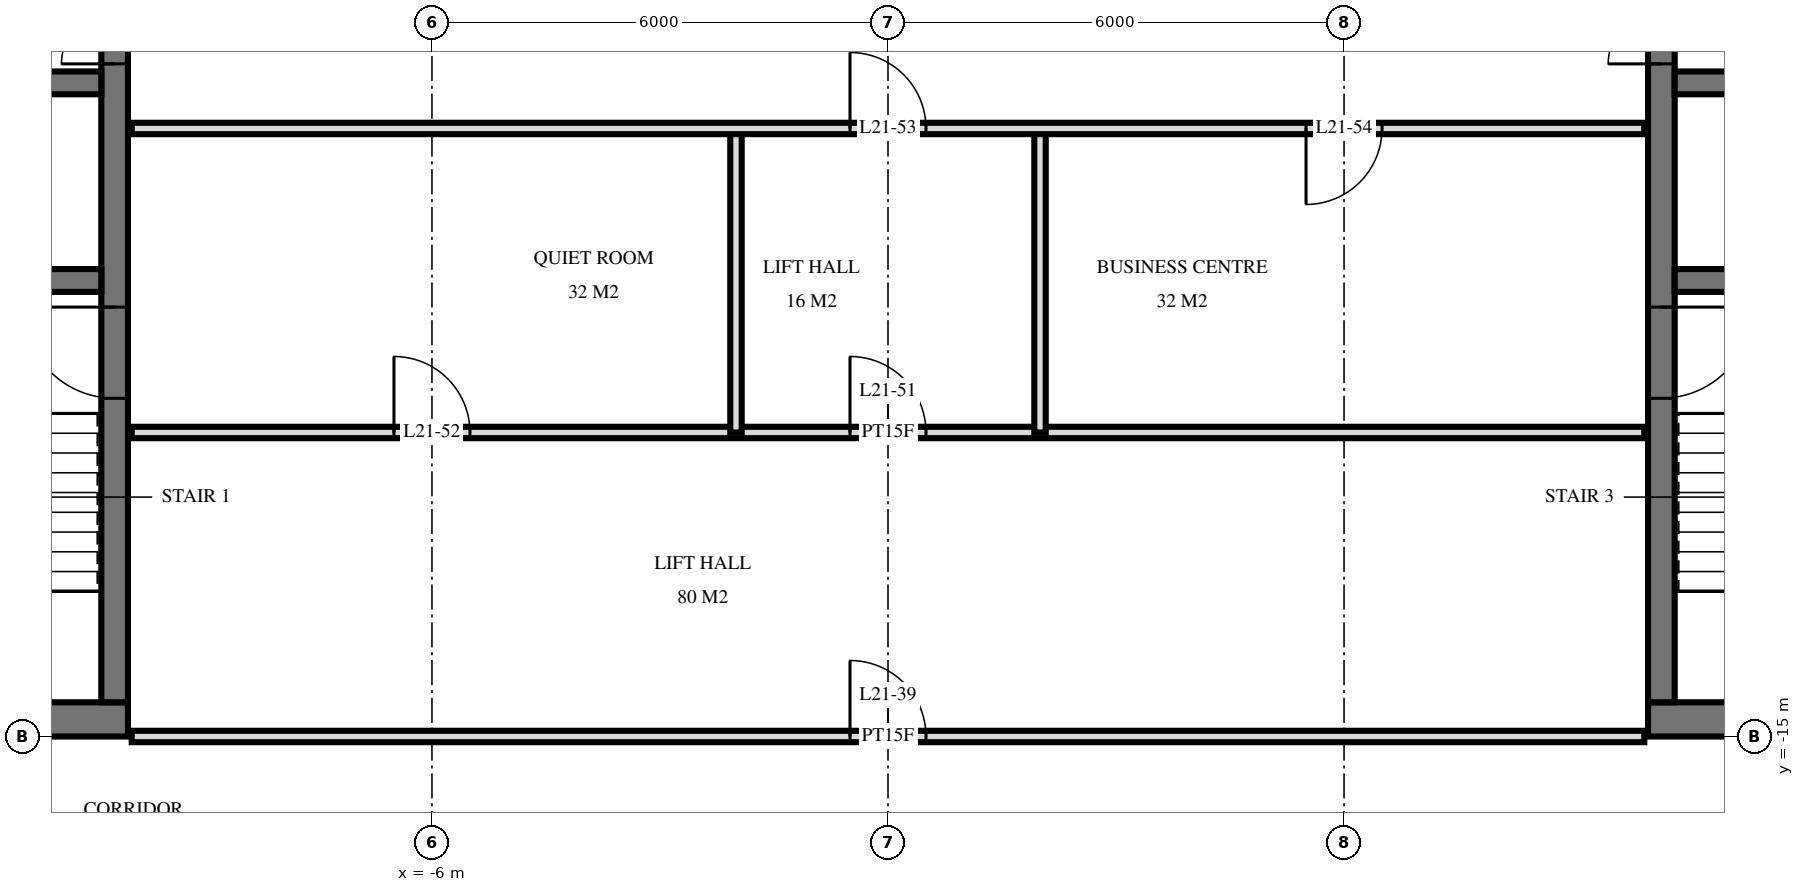
"""IFC4 building model, lengths in metres.
Left out: names, types, materials, properties, quantities, classifications, styles, units other than length and angle.
Written with IfcOpenShell. Run it as: python <this file> out.ifc"""

import sys

from ifc_helpers import new_model, si_unit, direction, frame, frame_2d, origin, place, context, subcontext, project, spatial, rectangle, extrude, element, fill, save


model = new_model("IFC4")
c1 = context("Model", 3, precision=1e-05, world=origin(), true_north=direction((0.0, 1.0)))
c2 = subcontext(c1, "Body", "Model", "MODEL_VIEW")
j1 = project(units=[si_unit("LENGTHUNIT", "METRE"), si_unit("PLANEANGLEUNIT", "RADIAN")], contexts=[c1])
p1 = place(None, origin())
s1 = spatial("IfcSite", under=j1, at=p1, CompositionType="ELEMENT")
p2 = place(p1, origin())
s2 = spatial("IfcBuilding", under=s1, at=p2, CompositionType="ELEMENT")
p3 = place(p2, frame((0.0, 0.0, 85.2)))
s3 = spatial("IfcBuildingStorey", under=s2, at=p3, CompositionType="ELEMENT", Elevation=85.2)
p4 = place(p3, frame((-29.5, -14.775, 0.0), z_axis=(0.0, 0.0, 1.0), x_axis=(1.0, 0.0, 0.0)))
e1 = element("IfcWall", 1, at=p4, inside=s3, PredefinedType="SHEAR", context=c2, shape_type="SweptSolid", body=[
    extrude(rectangle(XDim=19.5, YDim=0.45, at=frame_2d((9.75, 0.0))), origin(), (0.0, 0.0, 1.0), 3.6),
])
p5 = place(p4, frame((11.2, 0.0, 0.0)))
e2 = element("IfcOpeningElement", 2, at=p5, cuts=e1, PredefinedType="OPENING", context=c2, shape_type="SweptSolid", body=[
    extrude(rectangle(XDim=1.2, YDim=2.1, at=frame_2d((0.6, 1.05))), frame((0.0, 0.235, 0.0), z_axis=(0.0, -1.0, 0.0), x_axis=(1.0, 0.0, 0.0)), (0.0, 0.0, 1.0), 0.47),
])
p6 = place(p4, frame((14.25, 0.0, 0.0)))
e3 = element("IfcOpeningElement", 3, at=p6, cuts=e1, PredefinedType="OPENING", context=c2, shape_type="SweptSolid", body=[
    extrude(rectangle(XDim=1.1, YDim=2.1, at=frame_2d((0.55, 1.05))), frame((0.0, 0.235, 0.0), z_axis=(0.0, -1.0, 0.0), x_axis=(1.0, 0.0, 0.0)), (0.0, 0.0, 1.0), 0.47),
])
p7 = place(p4, frame((8.5, 0.0, 0.0)))
e4 = element("IfcOpeningElement", 4, at=p7, cuts=e1, PredefinedType="OPENING", context=c2, shape_type="SweptSolid", body=[
    extrude(rectangle(XDim=0.9, YDim=2.1, at=frame_2d((0.45, 1.05))), frame((0.0, 0.235, 0.0), z_axis=(0.0, -1.0, 0.0), x_axis=(1.0, 0.0, 0.0)), (0.0, 0.0, 1.0), 0.47),
])
p8 = place(p4, frame((6.05, 0.0, 0.0)))
e5 = element("IfcOpeningElement", 5, at=p8, cuts=e1, PredefinedType="OPENING", context=c2, shape_type="SweptSolid", body=[
    extrude(rectangle(XDim=1.0, YDim=2.1, at=frame_2d((0.5, 1.05))), frame((0.0, 0.235, 0.0), z_axis=(0.0, -1.0, 0.0), x_axis=(1.0, 0.0, 0.0)), (0.0, 0.0, 1.0), 0.47),
])
p9 = place(p4, frame((3.587, 0.0, 0.0)))
e6 = element("IfcOpeningElement", 6, at=p9, cuts=e1, PredefinedType="OPENING", context=c2, shape_type="SweptSolid", body=[
    extrude(rectangle(XDim=1.0, YDim=2.1, at=frame_2d((0.5, 1.05))), frame((0.0, 0.235, 0.0), z_axis=(0.0, -1.0, 0.0), x_axis=(1.0, 0.0, 0.0)), (0.0, 0.0, 1.0), 0.47),
])
p10 = place(p4, frame((1.85, 0.0, 0.0)))
e7 = element("IfcOpeningElement", 7, at=p10, cuts=e1, PredefinedType="OPENING", context=c2, shape_type="SweptSolid", body=[
    extrude(rectangle(XDim=1.0, YDim=2.1, at=frame_2d((0.5, 1.05))), frame((0.0, 0.235, 0.0), z_axis=(0.0, -1.0, 0.0), x_axis=(1.0, 0.0, 0.0)), (0.0, 0.0, 1.0), 0.47),
])
p11 = place(p4, frame((0.55, 0.0, 0.0)))
e8 = element("IfcOpeningElement", 8, at=p11, cuts=e1, PredefinedType="OPENING", context=c2, shape_type="SweptSolid", body=[
    extrude(rectangle(XDim=1.0, YDim=2.1, at=frame_2d((0.5, 1.05))), frame((0.0, 0.235, 0.0), z_axis=(0.0, -1.0, 0.0), x_axis=(1.0, 0.0, 0.0)), (0.0, 0.0, 1.0), 0.47),
])
p12 = place(p3, frame((-10.175, -14.55, 0.0), z_axis=(0.0, 0.0, 1.0), x_axis=(0.0, 1.0, 0.0)))
e9 = element("IfcWall", 9, at=p12, inside=s3, PredefinedType="SHEAR", context=c2, shape_type="SweptSolid", body=[
    extrude(rectangle(XDim=14.1, YDim=0.35, at=frame_2d((7.05, 0.0))), origin(), (0.0, 0.0, 1.0), 3.6),
])
p13 = place(p12, frame((8.4, 0.0, 0.0)))
e10 = element("IfcOpeningElement", 10, at=p13, cuts=e9, PredefinedType="OPENING", context=c2, shape_type="SweptSolid", body=[
    extrude(rectangle(XDim=1.4, YDim=2.4, at=frame_2d((0.7, 1.2))), frame((0.0, 0.185, 0.0), z_axis=(0.0, -1.0, 0.0), x_axis=(1.0, 0.0, 0.0)), (0.0, 0.0, 1.0), 0.37),
])
p14 = place(p12, frame((10.0, 0.0, 0.0)))
e11 = element("IfcOpeningElement", 11, at=p14, cuts=e9, PredefinedType="OPENING", context=c2, shape_type="SweptSolid", body=[
    extrude(rectangle(XDim=1.4, YDim=2.4, at=frame_2d((0.7, 1.2))), frame((0.0, 0.185, 0.0), z_axis=(0.0, -1.0, 0.0), x_axis=(1.0, 0.0, 0.0)), (0.0, 0.0, 1.0), 0.37),
])
p15 = place(p12, frame((4.0, 0.0, 0.0)))
e12 = element("IfcOpeningElement", 12, at=p15, cuts=e9, PredefinedType="OPENING", context=c2, shape_type="SweptSolid", body=[
    extrude(rectangle(XDim=1.2, YDim=2.1, at=frame_2d((0.6, 1.05))), frame((0.0, 0.185, 0.0), z_axis=(0.0, -1.0, 0.0), x_axis=(1.0, 0.0, 0.0)), (0.0, 0.0, 1.0), 0.37),
])
p16 = place(p3, frame((-29.05, -6.4, 0.0), z_axis=(0.0, 0.0, 1.0), x_axis=(1.0, 0.0, 0.0)))
e13 = element("IfcWall", 13, at=p16, inside=s3, PredefinedType="SHEAR", context=c2, shape_type="SweptSolid", body=[
    extrude(rectangle(XDim=18.7, YDim=0.3, at=frame_2d((9.35, 0.0))), origin(), (0.0, 0.0, 1.0), 3.6),
])
p17 = place(p16, frame((2.95, 0.0, 0.0)))
e14 = element("IfcOpeningElement", 14, at=p17, cuts=e13, PredefinedType="OPENING", context=c2, shape_type="SweptSolid", body=[
    extrude(rectangle(XDim=1.1, YDim=2.1, at=frame_2d((0.55, 1.05))), frame((0.0, 0.16, 0.0), z_axis=(0.0, -1.0, 0.0), x_axis=(1.0, 0.0, 0.0)), (0.0, 0.0, 1.0), 0.32),
])
p18 = place(p16, frame((0.55, 0.0, 0.0)))
e15 = element("IfcOpeningElement", 15, at=p18, cuts=e13, PredefinedType="OPENING", context=c2, shape_type="SweptSolid", body=[
    extrude(rectangle(XDim=1.1, YDim=2.1, at=frame_2d((0.55, 1.05))), frame((0.0, 0.16, 0.0), z_axis=(0.0, -1.0, 0.0), x_axis=(1.0, 0.0, 0.0)), (0.0, 0.0, 1.0), 0.32),
])
p19 = place(p16, frame((10.8, 0.0, 0.0)))
e16 = element("IfcOpeningElement", 16, at=p19, cuts=e13, PredefinedType="OPENING", context=c2, shape_type="SweptSolid", body=[
    extrude(rectangle(XDim=1.1, YDim=2.1, at=frame_2d((0.55, 1.05))), frame((0.0, 0.16, 0.0), z_axis=(0.0, -1.0, 0.0), x_axis=(1.0, 0.0, 0.0)), (0.0, 0.0, 1.0), 0.32),
])
p20 = place(p16, frame((5.6, 0.0, 0.0)))
e17 = element("IfcOpeningElement", 17, at=p20, cuts=e13, PredefinedType="OPENING", context=c2, shape_type="SweptSolid", body=[
    extrude(rectangle(XDim=1.0, YDim=2.1, at=frame_2d((0.5, 1.05))), frame((0.0, 0.16, 0.0), z_axis=(0.0, -1.0, 0.0), x_axis=(1.0, 0.0, 0.0)), (0.0, 0.0, 1.0), 0.32),
])
p21 = place(p3, frame((-29.05, -9.0, 0.0), z_axis=(0.0, 0.0, 1.0), x_axis=(1.0, 0.0, 0.0)))
e18 = element("IfcWall", 18, at=p21, inside=s3, PredefinedType="SHEAR", context=c2, shape_type="SweptSolid", body=[
    extrude(rectangle(XDim=18.7, YDim=0.3, at=frame_2d((9.35, 0.0))), origin(), (0.0, 0.0, 1.0), 3.6),
])
p22 = place(p21, frame((13.8, 0.0, 0.0)))
e19 = element("IfcOpeningElement", 19, at=p22, cuts=e18, PredefinedType="OPENING", context=c2, shape_type="SweptSolid", body=[
    extrude(rectangle(XDim=1.1, YDim=2.1, at=frame_2d((0.55, 1.05))), frame((0.0, 0.16, 0.0), z_axis=(0.0, -1.0, 0.0), x_axis=(1.0, 0.0, 0.0)), (0.0, 0.0, 1.0), 0.32),
])
p23 = place(p3, frame((10.0, -14.775, 0.0), z_axis=(0.0, 0.0, 1.0), x_axis=(1.0, 0.0, 0.0)))
e20 = element("IfcWall", 20, at=p23, inside=s3, PredefinedType="SHEAR", context=c2, shape_type="SweptSolid", body=[
    extrude(rectangle(XDim=19.5, YDim=0.45, at=frame_2d((9.75, 0.0))), origin(), (0.0, 0.0, 1.0), 3.6),
])
p24 = place(p23, frame((7.1, 0.0, 0.0)))
e21 = element("IfcOpeningElement", 21, at=p24, cuts=e20, PredefinedType="OPENING", context=c2, shape_type="SweptSolid", body=[
    extrude(rectangle(XDim=1.2, YDim=2.1, at=frame_2d((0.6, 1.05))), frame((0.0, 0.235, 0.0), z_axis=(0.0, -1.0, 0.0), x_axis=(1.0, 0.0, 0.0)), (0.0, 0.0, 1.0), 0.47),
])
p25 = place(p23, frame((4.15, 0.0, 0.0)))
e22 = element("IfcOpeningElement", 22, at=p25, cuts=e20, PredefinedType="OPENING", context=c2, shape_type="SweptSolid", body=[
    extrude(rectangle(XDim=1.1, YDim=2.1, at=frame_2d((0.55, 1.05))), frame((0.0, 0.235, 0.0), z_axis=(0.0, -1.0, 0.0), x_axis=(1.0, 0.0, 0.0)), (0.0, 0.0, 1.0), 0.47),
])
p26 = place(p23, frame((10.1, 0.0, 0.0)))
e23 = element("IfcOpeningElement", 23, at=p26, cuts=e20, PredefinedType="OPENING", context=c2, shape_type="SweptSolid", body=[
    extrude(rectangle(XDim=0.9, YDim=2.1, at=frame_2d((0.45, 1.05))), frame((0.0, 0.235, 0.0), z_axis=(0.0, -1.0, 0.0), x_axis=(1.0, 0.0, 0.0)), (0.0, 0.0, 1.0), 0.47),
])
p27 = place(p23, frame((12.45, 0.0, 0.0)))
e24 = element("IfcOpeningElement", 24, at=p27, cuts=e20, PredefinedType="OPENING", context=c2, shape_type="SweptSolid", body=[
    extrude(rectangle(XDim=1.0, YDim=2.1, at=frame_2d((0.5, 1.05))), frame((0.0, 0.235, 0.0), z_axis=(0.0, -1.0, 0.0), x_axis=(1.0, 0.0, 0.0)), (0.0, 0.0, 1.0), 0.47),
])
p28 = place(p23, frame((14.913, 0.0, 0.0)))
e25 = element("IfcOpeningElement", 25, at=p28, cuts=e20, PredefinedType="OPENING", context=c2, shape_type="SweptSolid", body=[
    extrude(rectangle(XDim=1.0, YDim=2.1, at=frame_2d((0.5, 1.05))), frame((0.0, 0.235, 0.0), z_axis=(0.0, -1.0, 0.0), x_axis=(1.0, 0.0, 0.0)), (0.0, 0.0, 1.0), 0.47),
])
p29 = place(p23, frame((16.65, 0.0, 0.0)))
e26 = element("IfcOpeningElement", 26, at=p29, cuts=e20, PredefinedType="OPENING", context=c2, shape_type="SweptSolid", body=[
    extrude(rectangle(XDim=1.0, YDim=2.1, at=frame_2d((0.5, 1.05))), frame((0.0, 0.235, 0.0), z_axis=(0.0, -1.0, 0.0), x_axis=(1.0, 0.0, 0.0)), (0.0, 0.0, 1.0), 0.47),
])
p30 = place(p23, frame((18.025, 0.0, 0.0)))
e27 = element("IfcOpeningElement", 27, at=p30, cuts=e20, PredefinedType="OPENING", context=c2, shape_type="SweptSolid", body=[
    extrude(rectangle(XDim=1.0, YDim=2.1, at=frame_2d((0.5, 1.05))), frame((0.0, 0.235, 0.0), z_axis=(0.0, -1.0, 0.0), x_axis=(1.0, 0.0, 0.0)), (0.0, 0.0, 1.0), 0.47),
])
p31 = place(p3, frame((10.175, -14.55, 0.0), z_axis=(0.0, 0.0, 1.0), x_axis=(0.0, 1.0, 0.0)))
e28 = element("IfcWall", 28, at=p31, inside=s3, PredefinedType="SHEAR", context=c2, shape_type="SweptSolid", body=[
    extrude(rectangle(XDim=14.1, YDim=0.35, at=frame_2d((7.05, 0.0))), origin(), (0.0, 0.0, 1.0), 3.6),
])
p32 = place(p31, frame((8.4, 0.0, 0.0)))
e29 = element("IfcOpeningElement", 29, at=p32, cuts=e28, PredefinedType="OPENING", context=c2, shape_type="SweptSolid", body=[
    extrude(rectangle(XDim=1.4, YDim=2.4, at=frame_2d((0.7, 1.2))), frame((0.0, 0.185, 0.0), z_axis=(0.0, -1.0, 0.0), x_axis=(1.0, 0.0, 0.0)), (0.0, 0.0, 1.0), 0.37),
])
p33 = place(p31, frame((10.0, 0.0, 0.0)))
e30 = element("IfcOpeningElement", 30, at=p33, cuts=e28, PredefinedType="OPENING", context=c2, shape_type="SweptSolid", body=[
    extrude(rectangle(XDim=1.4, YDim=2.4, at=frame_2d((0.7, 1.2))), frame((0.0, 0.185, 0.0), z_axis=(0.0, -1.0, 0.0), x_axis=(1.0, 0.0, 0.0)), (0.0, 0.0, 1.0), 0.37),
])
p34 = place(p31, frame((4.0, 0.0, 0.0)))
e31 = element("IfcOpeningElement", 31, at=p34, cuts=e28, PredefinedType="OPENING", context=c2, shape_type="SweptSolid", body=[
    extrude(rectangle(XDim=1.2, YDim=2.1, at=frame_2d((0.6, 1.05))), frame((0.0, 0.185, 0.0), z_axis=(0.0, -1.0, 0.0), x_axis=(1.0, 0.0, 0.0)), (0.0, 0.0, 1.0), 0.37),
])
p35 = place(p3, frame((10.35, -6.4, 0.0), z_axis=(0.0, 0.0, 1.0), x_axis=(1.0, 0.0, 0.0)))
e32 = element("IfcWall", 32, at=p35, inside=s3, PredefinedType="SHEAR", context=c2, shape_type="SweptSolid", body=[
    extrude(rectangle(XDim=18.7, YDim=0.3, at=frame_2d((9.35, 0.0))), origin(), (0.0, 0.0, 1.0), 3.6),
])
p36 = place(p35, frame((14.65, 0.0, 0.0)))
e33 = element("IfcOpeningElement", 33, at=p36, cuts=e32, PredefinedType="OPENING", context=c2, shape_type="SweptSolid", body=[
    extrude(rectangle(XDim=1.1, YDim=2.1, at=frame_2d((0.55, 1.05))), frame((0.0, 0.16, 0.0), z_axis=(0.0, -1.0, 0.0), x_axis=(1.0, 0.0, 0.0)), (0.0, 0.0, 1.0), 0.32),
])
p37 = place(p35, frame((17.05, 0.0, 0.0)))
e34 = element("IfcOpeningElement", 34, at=p37, cuts=e32, PredefinedType="OPENING", context=c2, shape_type="SweptSolid", body=[
    extrude(rectangle(XDim=1.1, YDim=2.1, at=frame_2d((0.55, 1.05))), frame((0.0, 0.16, 0.0), z_axis=(0.0, -1.0, 0.0), x_axis=(1.0, 0.0, 0.0)), (0.0, 0.0, 1.0), 0.32),
])
p38 = place(p35, frame((6.8, 0.0, 0.0)))
e35 = element("IfcOpeningElement", 35, at=p38, cuts=e32, PredefinedType="OPENING", context=c2, shape_type="SweptSolid", body=[
    extrude(rectangle(XDim=1.1, YDim=2.1, at=frame_2d((0.55, 1.05))), frame((0.0, 0.16, 0.0), z_axis=(0.0, -1.0, 0.0), x_axis=(1.0, 0.0, 0.0)), (0.0, 0.0, 1.0), 0.32),
])
p39 = place(p35, frame((12.1, 0.0, 0.0)))
e36 = element("IfcOpeningElement", 36, at=p39, cuts=e32, PredefinedType="OPENING", context=c2, shape_type="SweptSolid", body=[
    extrude(rectangle(XDim=1.0, YDim=2.1, at=frame_2d((0.5, 1.05))), frame((0.0, 0.16, 0.0), z_axis=(0.0, -1.0, 0.0), x_axis=(1.0, 0.0, 0.0)), (0.0, 0.0, 1.0), 0.32),
])
p40 = place(p3, frame((10.35, -9.0, 0.0), z_axis=(0.0, 0.0, 1.0), x_axis=(1.0, 0.0, 0.0)))
e37 = element("IfcWall", 37, at=p40, inside=s3, PredefinedType="SHEAR", context=c2, shape_type="SweptSolid", body=[
    extrude(rectangle(XDim=18.7, YDim=0.3, at=frame_2d((9.35, 0.0))), origin(), (0.0, 0.0, 1.0), 3.6),
])
p41 = place(p40, frame((3.8, 0.0, 0.0)))
e38 = element("IfcOpeningElement", 38, at=p41, cuts=e37, PredefinedType="OPENING", context=c2, shape_type="SweptSolid", body=[
    extrude(rectangle(XDim=1.1, YDim=2.1, at=frame_2d((0.55, 1.05))), frame((0.0, 0.16, 0.0), z_axis=(0.0, -1.0, 0.0), x_axis=(1.0, 0.0, 0.0)), (0.0, 0.0, 1.0), 0.32),
])
for number, where, z_axis, x_axis in (
    (39, (2.0, -11.0, 0.0), (0.0, 0.0, 1.0), (0.0, 1.0, 0.0)),
    (40, (-2.0, -11.0, 0.0), (0.0, 0.0, 1.0), (0.0, 1.0, 0.0)),
):
    element("IfcWall", number, at=place(p3, frame(where, z_axis=z_axis, x_axis=x_axis)), inside=s3, PredefinedType="PARTITIONING", context=c2, shape_type="SweptSolid", body=[
        extrude(rectangle(XDim=4.0, YDim=0.15, at=frame_2d((2.0, 0.0))), origin(), (0.0, 0.0, 1.0), 3.32),
    ])
p42 = place(p3, frame((-9.95, -15.0, 0.0), z_axis=(0.0, 0.0, 1.0), x_axis=(1.0, 0.0, 0.0)))
e41 = element("IfcWall", 41, at=p42, inside=s3, PredefinedType="PARTITIONING", context=c2, shape_type="SweptSolid", body=[
    extrude(rectangle(XDim=19.9, YDim=0.15, at=frame_2d((9.95, 0.0))), origin(), (0.0, 0.0, 1.0), 2.684),
])
p43 = place(p42, frame((9.45, 0.0, 0.0)))
e42 = element("IfcOpeningElement", 42, at=p43, cuts=e41, PredefinedType="OPENING", context=c2, shape_type="SweptSolid", body=[
    extrude(rectangle(XDim=1.0, YDim=2.1, at=frame_2d((0.5, 1.05))), frame((0.0, 0.085, 0.0), z_axis=(0.0, -1.0, 0.0), x_axis=(1.0, 0.0, 0.0)), (0.0, 0.0, 1.0), 0.17),
])
p44 = place(p3, frame((-9.95, -11.0, 0.0), z_axis=(0.0, 0.0, 1.0), x_axis=(1.0, 0.0, 0.0)))
e43 = element("IfcWall", 43, at=p44, inside=s3, PredefinedType="PARTITIONING", context=c2, shape_type="SweptSolid", body=[
    extrude(rectangle(XDim=19.9, YDim=0.15, at=frame_2d((9.95, 0.0))), origin(), (0.0, 0.0, 1.0), 3.32),
])
p45 = place(p44, frame((9.45, 0.0, 0.0)))
e44 = element("IfcOpeningElement", 44, at=p45, cuts=e43, PredefinedType="OPENING", context=c2, shape_type="SweptSolid", body=[
    extrude(rectangle(XDim=1.0, YDim=2.1, at=frame_2d((0.5, 1.05))), frame((0.0, 0.085, 0.0), z_axis=(0.0, -1.0, 0.0), x_axis=(1.0, 0.0, 0.0)), (0.0, 0.0, 1.0), 0.17),
])
p46 = place(p44, frame((3.45, 0.0, 0.0)))
e45 = element("IfcOpeningElement", 45, at=p46, cuts=e43, PredefinedType="OPENING", context=c2, shape_type="SweptSolid", body=[
    extrude(rectangle(XDim=1.0, YDim=2.1, at=frame_2d((0.5, 1.05))), frame((0.0, 0.085, 0.0), z_axis=(0.0, -1.0, 0.0), x_axis=(1.0, 0.0, 0.0)), (0.0, 0.0, 1.0), 0.17),
])
p47 = place(p3, frame((-9.95, -7.0, 0.0), z_axis=(0.0, 0.0, 1.0), x_axis=(1.0, 0.0, 0.0)))
e46 = element("IfcWall", 46, at=p47, inside=s3, PredefinedType="PARTITIONING", context=c2, shape_type="SweptSolid", body=[
    extrude(rectangle(XDim=19.9, YDim=0.15, at=frame_2d((9.95, 0.0))), origin(), (0.0, 0.0, 1.0), 3.32),
])
p48 = place(p47, frame((9.45, 0.0, 0.0)))
e47 = element("IfcOpeningElement", 47, at=p48, cuts=e46, PredefinedType="OPENING", context=c2, shape_type="SweptSolid", body=[
    extrude(rectangle(XDim=1.0, YDim=2.1, at=frame_2d((0.5, 1.05))), frame((0.0, 0.085, 0.0), z_axis=(0.0, -1.0, 0.0), x_axis=(1.0, 0.0, 0.0)), (0.0, 0.0, 1.0), 0.17),
])
p49 = place(p47, frame((15.45, 0.0, 0.0)))
e48 = element("IfcOpeningElement", 48, at=p49, cuts=e46, PredefinedType="OPENING", context=c2, shape_type="SweptSolid", body=[
    extrude(rectangle(XDim=1.0, YDim=2.1, at=frame_2d((0.5, 1.05))), frame((0.0, 0.085, 0.0), z_axis=(0.0, -1.0, 0.0), x_axis=(1.0, 0.0, 0.0)), (0.0, 0.0, 1.0), 0.17),
])
p50 = place(p13, origin())
e49 = element("IfcDoor", 49, at=p50, inside=s3, OperationType="DOUBLE_DOOR_SINGLE_SWING", PredefinedType="DOOR", context=c2, shape_type="SweptSolid", body=[
    extrude(rectangle(XDim=1.4, YDim=2.4, at=frame_2d((0.7, 1.2))), frame((0.0, 0.025, 0.0), z_axis=(0.0, -1.0, 0.0), x_axis=(1.0, 0.0, 0.0)), (0.0, 0.0, 1.0), 0.05),
])
fill(e10, e49)
p51 = place(p15, origin())
e50 = element("IfcDoor", 50, at=p51, inside=s3, OperationType="SINGLE_SWING_LEFT", PredefinedType="DOOR", context=c2, shape_type="SweptSolid", body=[
    extrude(rectangle(XDim=1.2, YDim=2.1, at=frame_2d((0.6, 1.05))), frame((0.0, 0.025, 0.0), z_axis=(0.0, -1.0, 0.0), x_axis=(1.0, 0.0, 0.0)), (0.0, 0.0, 1.0), 0.05),
])
fill(e12, e50)
p52 = place(p32, origin())
e51 = element("IfcDoor", 51, at=p52, inside=s3, OperationType="DOUBLE_DOOR_SINGLE_SWING", PredefinedType="DOOR", context=c2, shape_type="SweptSolid", body=[
    extrude(rectangle(XDim=1.4, YDim=2.4, at=frame_2d((0.7, 1.2))), frame((0.0, 0.025, 0.0), z_axis=(0.0, -1.0, 0.0), x_axis=(1.0, 0.0, 0.0)), (0.0, 0.0, 1.0), 0.05),
])
fill(e29, e51)
p53 = place(p34, frame((0.6, 0.0, 0.0), z_axis=(0.0, 0.0, 1.0), x_axis=(-1.0, 0.0, 0.0)))
e52 = element("IfcDoor", 52, at=p53, inside=s3, OperationType="SINGLE_SWING_RIGHT", PredefinedType="DOOR", context=c2, shape_type="SweptSolid", body=[
    extrude(rectangle(XDim=1.2, YDim=2.1, at=frame_2d((0.0, 1.05))), frame((0.0, -0.025, 0.0), z_axis=(0.0, 1.0, 0.0), x_axis=(-1.0, 0.0, 0.0)), (0.0, 0.0, 1.0), 0.05),
])
fill(e31, e52)
p54 = place(p43, origin())
e53 = element("IfcDoor", 53, at=p54, inside=s3, OperationType="SINGLE_SWING_RIGHT", PredefinedType="DOOR", context=c2, shape_type="SweptSolid", body=[
    extrude(rectangle(XDim=1.0, YDim=2.1, at=frame_2d((0.5, 1.05))), frame((0.0, 0.025, 0.0), z_axis=(0.0, -1.0, 0.0), x_axis=(1.0, 0.0, 0.0)), (0.0, 0.0, 1.0), 0.05),
])
fill(e42, e53)
p55 = place(p45, origin())
e54 = element("IfcDoor", 54, at=p55, inside=s3, OperationType="SINGLE_SWING_RIGHT", PredefinedType="DOOR", context=c2, shape_type="SweptSolid", body=[
    extrude(rectangle(XDim=1.0, YDim=2.1, at=frame_2d((0.5, 1.05))), frame((0.0, 0.025, 0.0), z_axis=(0.0, -1.0, 0.0), x_axis=(1.0, 0.0, 0.0)), (0.0, 0.0, 1.0), 0.05),
])
fill(e44, e54)
p56 = place(p46, origin())
e55 = element("IfcDoor", 55, at=p56, inside=s3, OperationType="SINGLE_SWING_RIGHT", PredefinedType="DOOR", context=c2, shape_type="SweptSolid", body=[
    extrude(rectangle(XDim=1.0, YDim=2.1, at=frame_2d((0.5, 1.05))), frame((0.0, 0.025, 0.0), z_axis=(0.0, -1.0, 0.0), x_axis=(1.0, 0.0, 0.0)), (0.0, 0.0, 1.0), 0.05),
])
fill(e45, e55)
p57 = place(p48, origin())
e56 = element("IfcDoor", 56, at=p57, inside=s3, OperationType="SINGLE_SWING_RIGHT", PredefinedType="DOOR", context=c2, shape_type="SweptSolid", body=[
    extrude(rectangle(XDim=1.0, YDim=2.1, at=frame_2d((0.5, 1.05))), frame((0.0, 0.025, 0.0), z_axis=(0.0, -1.0, 0.0), x_axis=(1.0, 0.0, 0.0)), (0.0, 0.0, 1.0), 0.05),
])
fill(e47, e56)
p58 = place(p49, frame((0.5, 0.0, 0.0), z_axis=(0.0, 0.0, 1.0), x_axis=(-1.0, 0.0, 0.0)))
e57 = element("IfcDoor", 57, at=p58, inside=s3, OperationType="SINGLE_SWING_LEFT", PredefinedType="DOOR", context=c2, shape_type="SweptSolid", body=[
    extrude(rectangle(XDim=1.0, YDim=2.1, at=frame_2d((0.0, 1.05))), frame((0.0, -0.025, 0.0), z_axis=(0.0, 1.0, 0.0), x_axis=(-1.0, 0.0, 0.0)), (0.0, 0.0, 1.0), 0.05),
])
fill(e48, e57)
save(model, sys.argv[1])
